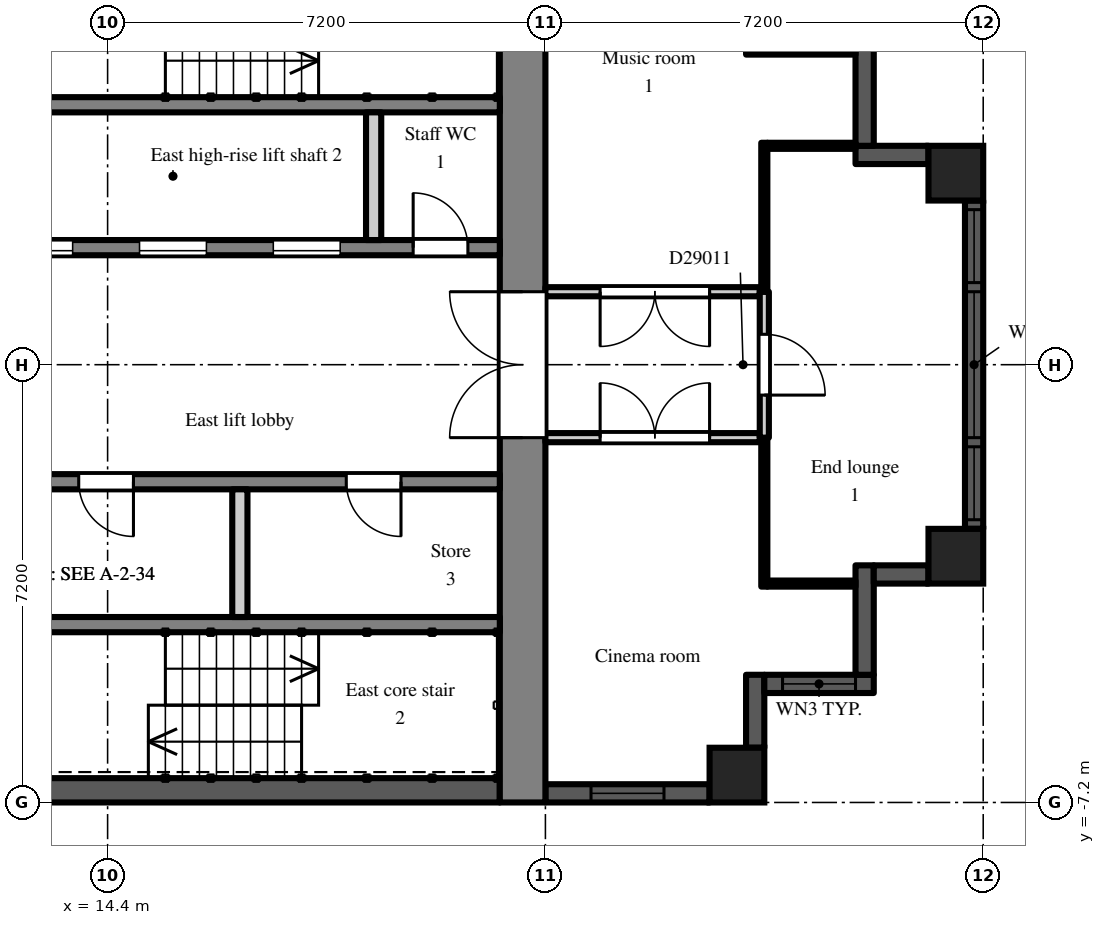
"""IFC4 building model, lengths in metres.
Left out: names, types, materials, properties, quantities, classifications, styles, units other than length and angle.
Written with IfcOpenShell. Run it as: python <this file> out.ifc"""

import sys

from ifc_helpers import new_model, si_unit, direction, frame, frame_2d, origin, origin_2d, place, context, subcontext, project, spatial, rectangle, extrude, element, fill, save


model = new_model("IFC4")
c1 = context("Model", 3, precision=1e-05, world=origin(), true_north=direction((0.0, 1.0)))
c2 = subcontext(c1, "Body", "Model", "MODEL_VIEW")
j1 = project(units=[si_unit("LENGTHUNIT", "METRE"), si_unit("PLANEANGLEUNIT", "RADIAN")], contexts=[c1])
p1 = place(None, origin())
s1 = spatial("IfcSite", under=j1, at=p1, CompositionType="ELEMENT")
p2 = place(p1, origin())
s2 = spatial("IfcBuilding", under=s1, at=p2, CompositionType="ELEMENT")
p3 = place(p2, frame((0.0, 0.0, 201.9)))
s3 = spatial("IfcBuildingStorey", under=s2, at=p3, CompositionType="ELEMENT", Elevation=201.9)
for number, where, z_axis, x_axis in (
    (1, (24.75, -6.75, 0.0), (0.0, 0.0, 1.0), (1.0, 0.0, 0.0)),
    (2, (28.35, -3.15, 0.0), (0.0, 0.0, 1.0), (1.0, 0.0, 0.0)),
    (3, (28.35, 3.15, 0.0), (0.0, 0.0, 1.0), (1.0, 0.0, 0.0)),
):
    element("IfcColumn", number, at=place(p3, frame(where, z_axis=z_axis, x_axis=x_axis)), inside=s3, PredefinedType="COLUMN", context=c2, shape_type="SweptSolid", body=[
        extrude(rectangle(XDim=0.9, YDim=0.9, at=origin_2d()), origin(), (0.0, 0.0, 1.0), 3.0),
    ])
p4 = place(p3, frame((21.6, -7.05, 0.0), z_axis=(0.0, 0.0, 1.0), x_axis=(1.0, 0.0, 0.0)))
e4 = element("IfcWall", 4, at=p4, inside=s3, PredefinedType="SOLIDWALL", context=c2, shape_type="SweptSolid", body=[
    extrude(rectangle(XDim=2.7, YDim=0.3, at=frame_2d((1.35, 0.0))), origin(), (0.0, 0.0, 1.0), 2.3),
])
p5 = place(p4, frame((0.75, 0.0, 0.2)))
e5 = element("IfcOpeningElement", 5, at=p5, cuts=e4, PredefinedType="OPENING", context=c2, shape_type="SweptSolid", body=[
    extrude(rectangle(XDim=1.2, YDim=1.85, at=frame_2d((0.6, 0.925))), frame((0.0, 0.16, 0.0), z_axis=(0.0, -1.0, 0.0), x_axis=(1.0, 0.0, 0.0)), (0.0, 0.0, 1.0), 0.32),
])
p6 = place(p3, frame((25.05, -6.3, 0.0), z_axis=(0.0, 0.0, 1.0), x_axis=(0.0, 1.0, 0.0)))
e6 = element("IfcWall", 6, at=p6, inside=s3, PredefinedType="SOLIDWALL", context=c2, shape_type="SweptSolid", body=[
    extrude(rectangle(XDim=1.2, YDim=0.3, at=frame_2d((0.6, 0.0))), origin(), (0.0, 0.0, 1.0), 2.6),
])
p7 = place(p3, frame((25.2, -5.25, 0.0), z_axis=(0.0, 0.0, 1.0), x_axis=(1.0, 0.0, 0.0)))
e7 = element("IfcWall", 7, at=p7, inside=s3, PredefinedType="SOLIDWALL", context=c2, shape_type="SweptSolid", body=[
    extrude(rectangle(XDim=1.8, YDim=0.3, at=frame_2d((0.9, 0.0))), origin(), (0.0, 0.0, 1.0), 2.6),
])
p8 = place(p7, frame((0.3, 0.0, 0.2)))
e8 = element("IfcOpeningElement", 8, at=p8, cuts=e7, PredefinedType="OPENING", context=c2, shape_type="SweptSolid", body=[
    extrude(rectangle(XDim=1.2, YDim=1.85, at=frame_2d((0.6, 0.925))), frame((0.0, 0.16, 0.0), z_axis=(0.0, -1.0, 0.0), x_axis=(1.0, 0.0, 0.0)), (0.0, 0.0, 1.0), 0.32),
])
p9 = place(p3, frame((26.85, -5.1, 0.0), z_axis=(0.0, 0.0, 1.0), x_axis=(0.0, 1.0, 0.0)))
e9 = element("IfcWall", 9, at=p9, inside=s3, PredefinedType="SOLIDWALL", context=c2, shape_type="SweptSolid", body=[
    extrude(rectangle(XDim=1.8, YDim=0.3, at=frame_2d((0.9, 0.0))), origin(), (0.0, 0.0, 1.0), 2.6),
])
p10 = place(p3, frame((27.0, -3.45, 0.0), z_axis=(0.0, 0.0, 1.0), x_axis=(1.0, 0.0, 0.0)))
e10 = element("IfcWall", 10, at=p10, inside=s3, PredefinedType="SOLIDWALL", context=c2, shape_type="SweptSolid", body=[
    extrude(rectangle(XDim=0.9, YDim=0.3, at=frame_2d((0.45, 0.0))), origin(), (0.0, 0.0, 1.0), 2.6),
])
p11 = place(p3, frame((28.65, -2.7, 0.0), z_axis=(0.0, 0.0, 1.0), x_axis=(0.0, 1.0, 0.0)))
e11 = element("IfcWall", 11, at=p11, inside=s3, PredefinedType="SOLIDWALL", context=c2, shape_type="SweptSolid", body=[
    extrude(rectangle(XDim=5.4, YDim=0.3, at=frame_2d((2.7, 0.0))), origin(), (0.0, 0.0, 1.0), 2.3),
])
p12 = place(p11, frame((1.5, 0.0, 0.2)))
e12 = element("IfcOpeningElement", 12, at=p12, cuts=e11, PredefinedType="OPENING", context=c2, shape_type="SweptSolid", body=[
    extrude(rectangle(XDim=2.4, YDim=1.85, at=frame_2d((1.2, 0.925))), frame((0.0, 0.16, 0.0), z_axis=(0.0, -1.0, 0.0), x_axis=(1.0, 0.0, 0.0)), (0.0, 0.0, 1.0), 0.32),
])
p13 = place(p11, frame((0.15, 0.0, 0.2)))
e13 = element("IfcOpeningElement", 13, at=p13, cuts=e11, PredefinedType="OPENING", context=c2, shape_type="SweptSolid", body=[
    extrude(rectangle(XDim=1.2, YDim=1.85, at=frame_2d((0.6, 0.925))), frame((0.0, 0.16, 0.0), z_axis=(0.0, -1.0, 0.0), x_axis=(1.0, 0.0, 0.0)), (0.0, 0.0, 1.0), 0.32),
])
p14 = place(p11, frame((4.05, 0.0, 0.2)))
e14 = element("IfcOpeningElement", 14, at=p14, cuts=e11, PredefinedType="OPENING", context=c2, shape_type="SweptSolid", body=[
    extrude(rectangle(XDim=1.2, YDim=1.85, at=frame_2d((0.6, 0.925))), frame((0.0, 0.16, 0.0), z_axis=(0.0, -1.0, 0.0), x_axis=(1.0, 0.0, 0.0)), (0.0, 0.0, 1.0), 0.32),
])
p15 = place(p3, frame((27.9, 3.45, 0.0), z_axis=(0.0, 0.0, 1.0), x_axis=(-1.0, 0.0, 0.0)))
e15 = element("IfcWall", 15, at=p15, inside=s3, PredefinedType="SOLIDWALL", context=c2, shape_type="SweptSolid", body=[
    extrude(rectangle(XDim=1.2, YDim=0.3, at=frame_2d((0.6, 0.0))), origin(), (0.0, 0.0, 1.0), 2.6),
])
p16 = place(p3, frame((26.85, 3.6, 0.0), z_axis=(0.0, 0.0, 1.0), x_axis=(0.0, 1.0, 0.0)))
e16 = element("IfcWall", 16, at=p16, inside=s3, PredefinedType="SOLIDWALL", context=c2, shape_type="SweptSolid", body=[
    extrude(rectangle(XDim=1.8, YDim=0.3, at=frame_2d((0.9, 0.0))), origin(), (0.0, 0.0, 1.0), 2.6),
])
p17 = place(p3, frame((26.7, 5.25, 0.0), z_axis=(0.0, 0.0, 1.0), x_axis=(-1.0, 0.0, 0.0)))
e17 = element("IfcWall", 17, at=p17, inside=s3, PredefinedType="SOLIDWALL", context=c2, shape_type="SweptSolid", body=[
    extrude(rectangle(XDim=1.8, YDim=0.3, at=frame_2d((0.9, 0.0))), origin(), (0.0, 0.0, 1.0), 2.6),
])
p18 = place(p3, frame((21.225, -7.2, 0.0), z_axis=(0.0, 0.0, 1.0), x_axis=(0.0, 1.0, 0.0)))
e18 = element("IfcWall", 18, at=p18, inside=s3, PredefinedType="SHEAR", context=c2, shape_type="SweptSolid", body=[
    extrude(rectangle(XDim=14.4, YDim=0.75, at=frame_2d((7.2, 0.0))), origin(), (0.0, 0.0, 1.0), 2.6),
])
p19 = place(p18, frame((6.0, 0.0, 0.0)))
e19 = element("IfcOpeningElement", 19, at=p19, cuts=e18, PredefinedType="OPENING", context=c2, shape_type="SweptSolid", body=[
    extrude(rectangle(XDim=2.4, YDim=2.2, at=frame_2d((1.2, 1.1))), frame((0.0, 0.385, 0.0), z_axis=(0.0, -1.0, 0.0), x_axis=(1.0, 0.0, 0.0)), (0.0, 0.0, 1.0), 0.77),
])
p20 = place(p3, frame((7.9, 1.925, 0.0), z_axis=(0.0, 0.0, 1.0), x_axis=(1.0, 0.0, 0.0)))
e20 = element("IfcWall", 20, at=p20, inside=s3, PredefinedType="SHEAR", context=c2, shape_type="SweptSolid", body=[
    extrude(rectangle(XDim=12.95, YDim=0.25, at=frame_2d((6.475, 0.0))), origin(), (0.0, 0.0, 1.0), 2.6),
])
p21 = place(p20, frame((4.825, 0.0, 0.0)))
e21 = element("IfcOpeningElement", 21, at=p21, cuts=e20, PredefinedType="OPENING", context=c2, shape_type="SweptSolid", body=[
    extrude(rectangle(XDim=1.1, YDim=2.1, at=frame_2d((0.55, 1.05))), frame((0.0, 0.135, 0.0), z_axis=(0.0, -1.0, 0.0), x_axis=(1.0, 0.0, 0.0)), (0.0, 0.0, 1.0), 0.27),
])
p22 = place(p20, frame((7.025, 0.0, 0.0)))
e22 = element("IfcOpeningElement", 22, at=p22, cuts=e20, PredefinedType="OPENING", context=c2, shape_type="SweptSolid", body=[
    extrude(rectangle(XDim=1.1, YDim=2.1, at=frame_2d((0.55, 1.05))), frame((0.0, 0.135, 0.0), z_axis=(0.0, -1.0, 0.0), x_axis=(1.0, 0.0, 0.0)), (0.0, 0.0, 1.0), 0.27),
])
p23 = place(p20, frame((9.225, 0.0, 0.0)))
e23 = element("IfcOpeningElement", 23, at=p23, cuts=e20, PredefinedType="OPENING", context=c2, shape_type="SweptSolid", body=[
    extrude(rectangle(XDim=1.1, YDim=2.1, at=frame_2d((0.55, 1.05))), frame((0.0, 0.135, 0.0), z_axis=(0.0, -1.0, 0.0), x_axis=(1.0, 0.0, 0.0)), (0.0, 0.0, 1.0), 0.27),
])
p24 = place(p20, frame((0.525, 0.0, 0.0)))
e24 = element("IfcOpeningElement", 24, at=p24, cuts=e20, PredefinedType="OPENING", context=c2, shape_type="SweptSolid", body=[
    extrude(rectangle(XDim=0.9, YDim=2.1, at=frame_2d((0.45, 1.05))), frame((0.0, 0.135, 0.0), z_axis=(0.0, -1.0, 0.0), x_axis=(1.0, 0.0, 0.0)), (0.0, 0.0, 1.0), 0.27),
])
p25 = place(p20, frame((2.625, 0.0, 0.0)))
e25 = element("IfcOpeningElement", 25, at=p25, cuts=e20, PredefinedType="OPENING", context=c2, shape_type="SweptSolid", body=[
    extrude(rectangle(XDim=1.1, YDim=2.1, at=frame_2d((0.55, 1.05))), frame((0.0, 0.135, 0.0), z_axis=(0.0, -1.0, 0.0), x_axis=(1.0, 0.0, 0.0)), (0.0, 0.0, 1.0), 0.27),
])
p26 = place(p20, frame((11.525, 0.0, 0.0)))
e26 = element("IfcOpeningElement", 26, at=p26, cuts=e20, PredefinedType="OPENING", context=c2, shape_type="SweptSolid", body=[
    extrude(rectangle(XDim=0.9, YDim=2.1, at=frame_2d((0.45, 1.05))), frame((0.0, 0.135, 0.0), z_axis=(0.0, -1.0, 0.0), x_axis=(1.0, 0.0, 0.0)), (0.0, 0.0, 1.0), 0.27),
])
p27 = place(p3, frame((12.3, 4.275, 0.0), z_axis=(0.0, 0.0, 1.0), x_axis=(1.0, 0.0, 0.0)))
e27 = element("IfcWall", 27, at=p27, inside=s3, PredefinedType="SHEAR", context=c2, shape_type="SweptSolid", body=[
    extrude(rectangle(XDim=8.55, YDim=0.25, at=frame_2d((4.275, 0.0))), origin(), (0.0, 0.0, 1.0), 2.6),
])
p28 = place(p3, frame((18.775, 2.05, 0.0), z_axis=(0.0, 0.0, 1.0), x_axis=(0.0, 1.0, 0.0)))
e28 = element("IfcWall", 28, at=p28, inside=s3, PredefinedType="PARTITIONING", context=c2, shape_type="SweptSolid", body=[
    extrude(rectangle(XDim=2.1, YDim=0.25, at=frame_2d((1.05, 0.0))), origin(), (0.0, 0.0, 1.0), 2.6),
])
p29 = place(p3, frame((7.9, -7.0, 0.0), z_axis=(0.0, 0.0, 1.0), x_axis=(1.0, 0.0, 0.0)))
e29 = element("IfcWall", 29, at=p29, inside=s3, PredefinedType="SHEAR", context=c2, shape_type="SweptSolid", body=[
    extrude(rectangle(XDim=12.95, YDim=0.4, at=frame_2d((6.475, 0.0))), origin(), (0.0, 0.0, 1.0), 2.6),
])
p30 = place(p3, frame((7.9, -1.925, 0.0), z_axis=(0.0, 0.0, 1.0), x_axis=(1.0, 0.0, 0.0)))
e30 = element("IfcWall", 30, at=p30, inside=s3, PredefinedType="SHEAR", context=c2, shape_type="SweptSolid", body=[
    extrude(rectangle(XDim=12.95, YDim=0.25, at=frame_2d((6.475, 0.0))), origin(), (0.0, 0.0, 1.0), 2.6),
])
p31 = place(p30, frame((0.525, 0.0, 0.0)))
e31 = element("IfcOpeningElement", 31, at=p31, cuts=e30, PredefinedType="OPENING", context=c2, shape_type="SweptSolid", body=[
    extrude(rectangle(XDim=0.9, YDim=2.1, at=frame_2d((0.45, 1.05))), frame((0.0, 0.135, 0.0), z_axis=(0.0, -1.0, 0.0), x_axis=(1.0, 0.0, 0.0)), (0.0, 0.0, 1.0), 0.27),
])
p32 = place(p30, frame((2.625, 0.0, 0.0)))
e32 = element("IfcOpeningElement", 32, at=p32, cuts=e30, PredefinedType="OPENING", context=c2, shape_type="SweptSolid", body=[
    extrude(rectangle(XDim=1.1, YDim=2.1, at=frame_2d((0.55, 1.05))), frame((0.0, 0.135, 0.0), z_axis=(0.0, -1.0, 0.0), x_axis=(1.0, 0.0, 0.0)), (0.0, 0.0, 1.0), 0.27),
])
p33 = place(p30, frame((6.025, 0.0, 0.0)))
e33 = element("IfcOpeningElement", 33, at=p33, cuts=e30, PredefinedType="OPENING", context=c2, shape_type="SweptSolid", body=[
    extrude(rectangle(XDim=0.9, YDim=2.1, at=frame_2d((0.45, 1.05))), frame((0.0, 0.135, 0.0), z_axis=(0.0, -1.0, 0.0), x_axis=(1.0, 0.0, 0.0)), (0.0, 0.0, 1.0), 0.27),
])
p34 = place(p30, frame((10.425, 0.0, 0.0)))
e34 = element("IfcOpeningElement", 34, at=p34, cuts=e30, PredefinedType="OPENING", context=c2, shape_type="SweptSolid", body=[
    extrude(rectangle(XDim=0.9, YDim=2.1, at=frame_2d((0.45, 1.05))), frame((0.0, 0.135, 0.0), z_axis=(0.0, -1.0, 0.0), x_axis=(1.0, 0.0, 0.0)), (0.0, 0.0, 1.0), 0.27),
])
p35 = place(p3, frame((12.3, -4.275, 0.0), z_axis=(0.0, 0.0, 1.0), x_axis=(1.0, 0.0, 0.0)))
e35 = element("IfcWall", 35, at=p35, inside=s3, PredefinedType="SHEAR", context=c2, shape_type="SweptSolid", body=[
    extrude(rectangle(XDim=8.55, YDim=0.25, at=frame_2d((4.275, 0.0))), origin(), (0.0, 0.0, 1.0), 2.6),
])
p36 = place(p3, frame((16.575, -2.05, 0.0), z_axis=(0.0, 0.0, 1.0), x_axis=(0.0, -1.0, 0.0)))
e36 = element("IfcWall", 36, at=p36, inside=s3, PredefinedType="PARTITIONING", context=c2, shape_type="SweptSolid", body=[
    extrude(rectangle(XDim=2.1, YDim=0.25, at=frame_2d((1.05, 0.0))), origin(), (0.0, 0.0, 1.0), 2.6),
])
p37 = place(p3, frame((21.6, -1.2, 0.0), z_axis=(0.0, 0.0, 1.0), x_axis=(1.0, 0.0, 0.0)))
e37 = element("IfcWall", 37, at=p37, inside=s3, PredefinedType="PARTITIONING", context=c2, shape_type="SweptSolid", body=[
    extrude(rectangle(XDim=3.525, YDim=0.15, at=frame_2d((1.762, 0.0))), origin(), (0.0, 0.0, 1.0), 2.6),
])
p38 = place(p37, frame((0.9, 0.0, 0.0)))
e38 = element("IfcOpeningElement", 38, at=p38, cuts=e37, PredefinedType="OPENING", context=c2, shape_type="SweptSolid", body=[
    extrude(rectangle(XDim=1.8, YDim=2.1, at=frame_2d((0.9, 1.05))), frame((0.0, 0.085, 0.0), z_axis=(0.0, -1.0, 0.0), x_axis=(1.0, 0.0, 0.0)), (0.0, 0.0, 1.0), 0.17),
])
p39 = place(p3, frame((21.6, 1.2, 0.0), z_axis=(0.0, 0.0, 1.0), x_axis=(1.0, 0.0, 0.0)))
e39 = element("IfcWall", 39, at=p39, inside=s3, PredefinedType="PARTITIONING", context=c2, shape_type="SweptSolid", body=[
    extrude(rectangle(XDim=3.525, YDim=0.15, at=frame_2d((1.762, 0.0))), origin(), (0.0, 0.0, 1.0), 2.6),
])
p40 = place(p39, frame((0.9, 0.0, 0.0)))
e40 = element("IfcOpeningElement", 40, at=p40, cuts=e39, PredefinedType="OPENING", context=c2, shape_type="SweptSolid", body=[
    extrude(rectangle(XDim=1.8, YDim=2.1, at=frame_2d((0.9, 1.05))), frame((0.0, 0.085, 0.0), z_axis=(0.0, -1.0, 0.0), x_axis=(1.0, 0.0, 0.0)), (0.0, 0.0, 1.0), 0.17),
])
p41 = place(p3, frame((25.2, -3.65, 0.0), z_axis=(0.0, 0.0, 1.0), x_axis=(0.0, 1.0, 0.0)))
e41 = element("IfcWall", 41, at=p41, inside=s3, PredefinedType="PARTITIONING", context=c2, shape_type="SweptSolid", body=[
    extrude(rectangle(XDim=2.45, YDim=0.1, at=frame_2d((1.225, 0.0))), origin(), (0.0, 0.0, 1.0), 2.6),
])
p42 = place(p3, frame((25.25, -3.6, 0.0), z_axis=(0.0, 0.0, 1.0), x_axis=(1.0, 0.0, 0.0)))
e42 = element("IfcWall", 42, at=p42, inside=s3, PredefinedType="PARTITIONING", context=c2, shape_type="SweptSolid", body=[
    extrude(rectangle(XDim=1.45, YDim=0.1, at=frame_2d((0.725, 0.0))), origin(), (0.0, 0.0, 1.0), 2.6),
])
p43 = place(p3, frame((25.2, -1.2, 0.0), z_axis=(0.0, 0.0, 1.0), x_axis=(0.0, 1.0, 0.0)))
e43 = element("IfcWall", 43, at=p43, inside=s3, PredefinedType="PARTITIONING", context=c2, shape_type="SweptSolid", body=[
    extrude(rectangle(XDim=2.4, YDim=0.15, at=frame_2d((1.2, 0.0))), origin(), (0.0, 0.0, 1.0), 2.6),
])
p44 = place(p43, frame((0.7, 0.0, 0.0)))
e44 = element("IfcOpeningElement", 44, at=p44, cuts=e43, PredefinedType="OPENING", context=c2, shape_type="SweptSolid", body=[
    extrude(rectangle(XDim=1.0, YDim=2.1, at=frame_2d((0.5, 1.05))), frame((0.0, 0.085, 0.0), z_axis=(0.0, -1.0, 0.0), x_axis=(1.0, 0.0, 0.0)), (0.0, 0.0, 1.0), 0.17),
])
p45 = place(p3, frame((25.2, 1.2, 0.0), z_axis=(0.0, 0.0, 1.0), x_axis=(0.0, 1.0, 0.0)))
e45 = element("IfcWall", 45, at=p45, inside=s3, PredefinedType="PARTITIONING", context=c2, shape_type="SweptSolid", body=[
    extrude(rectangle(XDim=2.45, YDim=0.1, at=frame_2d((1.225, 0.0))), origin(), (0.0, 0.0, 1.0), 2.6),
])
p46 = place(p3, frame((25.25, 3.6, 0.0), z_axis=(0.0, 0.0, 1.0), x_axis=(1.0, 0.0, 0.0)))
e46 = element("IfcWall", 46, at=p46, inside=s3, PredefinedType="PARTITIONING", context=c2, shape_type="SweptSolid", body=[
    extrude(rectangle(XDim=1.45, YDim=0.1, at=frame_2d((0.725, 0.0))), origin(), (0.0, 0.0, 1.0), 2.6),
])
p47 = place(p5, origin())
e47 = element("IfcWindow", 47, at=p47, inside=s3, PartitioningType="SINGLE_PANEL", PredefinedType="WINDOW", context=c2, shape_type="SweptSolid", body=[
    extrude(rectangle(XDim=1.2, YDim=1.85, at=frame_2d((0.6, 0.925))), frame((0.0, 0.03, 0.0), z_axis=(0.0, -1.0, 0.0), x_axis=(1.0, 0.0, 0.0)), (0.0, 0.0, 1.0), 0.06),
])
fill(e5, e47)
p48 = place(p8, origin())
e48 = element("IfcWindow", 48, at=p48, inside=s3, PartitioningType="SINGLE_PANEL", PredefinedType="WINDOW", context=c2, shape_type="SweptSolid", body=[
    extrude(rectangle(XDim=1.2, YDim=1.85, at=frame_2d((0.6, 0.925))), frame((0.0, 0.03, 0.0), z_axis=(0.0, -1.0, 0.0), x_axis=(1.0, 0.0, 0.0)), (0.0, 0.0, 1.0), 0.06),
])
fill(e8, e48)
p49 = place(p12, origin())
e49 = element("IfcWindow", 49, at=p49, inside=s3, PartitioningType="SINGLE_PANEL", PredefinedType="WINDOW", context=c2, shape_type="SweptSolid", body=[
    extrude(rectangle(XDim=2.4, YDim=1.85, at=frame_2d((1.2, 0.925))), frame((0.0, 0.03, 0.0), z_axis=(0.0, -1.0, 0.0), x_axis=(1.0, 0.0, 0.0)), (0.0, 0.0, 1.0), 0.06),
])
fill(e12, e49)
p50 = place(p13, origin())
e50 = element("IfcWindow", 50, at=p50, inside=s3, PartitioningType="SINGLE_PANEL", PredefinedType="WINDOW", context=c2, shape_type="SweptSolid", body=[
    extrude(rectangle(XDim=1.2, YDim=1.85, at=frame_2d((0.6, 0.925))), frame((0.0, 0.03, 0.0), z_axis=(0.0, -1.0, 0.0), x_axis=(1.0, 0.0, 0.0)), (0.0, 0.0, 1.0), 0.06),
])
fill(e13, e50)
p51 = place(p14, origin())
e51 = element("IfcWindow", 51, at=p51, inside=s3, PartitioningType="SINGLE_PANEL", PredefinedType="WINDOW", context=c2, shape_type="SweptSolid", body=[
    extrude(rectangle(XDim=1.2, YDim=1.85, at=frame_2d((0.6, 0.925))), frame((0.0, 0.03, 0.0), z_axis=(0.0, -1.0, 0.0), x_axis=(1.0, 0.0, 0.0)), (0.0, 0.0, 1.0), 0.06),
])
fill(e14, e51)
p52 = place(p21, origin())
e52 = element("IfcDoor", 52, at=p52, inside=s3, OperationType="SLIDING_TO_LEFT", PredefinedType="DOOR", context=c2, shape_type="SweptSolid", body=[
    extrude(rectangle(XDim=1.1, YDim=2.1, at=frame_2d((0.55, 1.05))), frame((0.0, 0.025, 0.0), z_axis=(0.0, -1.0, 0.0), x_axis=(1.0, 0.0, 0.0)), (0.0, 0.0, 1.0), 0.05),
])
fill(e21, e52)
p53 = place(p22, origin())
e53 = element("IfcDoor", 53, at=p53, inside=s3, OperationType="SLIDING_TO_LEFT", PredefinedType="DOOR", context=c2, shape_type="SweptSolid", body=[
    extrude(rectangle(XDim=1.1, YDim=2.1, at=frame_2d((0.55, 1.05))), frame((0.0, 0.025, 0.0), z_axis=(0.0, -1.0, 0.0), x_axis=(1.0, 0.0, 0.0)), (0.0, 0.0, 1.0), 0.05),
])
fill(e22, e53)
p54 = place(p23, origin())
e54 = element("IfcDoor", 54, at=p54, inside=s3, OperationType="SLIDING_TO_LEFT", PredefinedType="DOOR", context=c2, shape_type="SweptSolid", body=[
    extrude(rectangle(XDim=1.1, YDim=2.1, at=frame_2d((0.55, 1.05))), frame((0.0, 0.025, 0.0), z_axis=(0.0, -1.0, 0.0), x_axis=(1.0, 0.0, 0.0)), (0.0, 0.0, 1.0), 0.05),
])
fill(e23, e54)
p55 = place(p19, origin())
e55 = element("IfcDoor", 55, at=p55, inside=s3, OperationType="DOUBLE_DOOR_DOUBLE_SWING", PredefinedType="DOOR", context=c2, shape_type="SweptSolid", body=[
    extrude(rectangle(XDim=2.4, YDim=2.2, at=frame_2d((1.2, 1.1))), frame((0.0, 0.025, 0.0), z_axis=(0.0, -1.0, 0.0), x_axis=(1.0, 0.0, 0.0)), (0.0, 0.0, 1.0), 0.05),
])
fill(e19, e55)
p56 = place(p26, origin())
e56 = element("IfcDoor", 56, at=p56, inside=s3, OperationType="SINGLE_SWING_LEFT", PredefinedType="DOOR", context=c2, shape_type="SweptSolid", body=[
    extrude(rectangle(XDim=0.9, YDim=2.1, at=frame_2d((0.45, 1.05))), frame((0.0, 0.025, 0.0), z_axis=(0.0, -1.0, 0.0), x_axis=(1.0, 0.0, 0.0)), (0.0, 0.0, 1.0), 0.05),
])
fill(e26, e56)
p57 = place(p33, frame((0.9, 0.0, 0.0), z_axis=(0.0, 0.0, 1.0), x_axis=(-1.0, 0.0, 0.0)))
e57 = element("IfcDoor", 57, at=p57, inside=s3, OperationType="SINGLE_SWING_LEFT", PredefinedType="DOOR", context=c2, shape_type="SweptSolid", body=[
    extrude(rectangle(XDim=0.9, YDim=2.1, at=frame_2d((0.45, 1.05))), frame((0.0, 0.025, 0.0), z_axis=(0.0, -1.0, 0.0), x_axis=(1.0, 0.0, 0.0)), (0.0, 0.0, 1.0), 0.05),
])
fill(e33, e57)
p58 = place(p34, frame((0.9, 0.0, 0.0), z_axis=(0.0, 0.0, 1.0), x_axis=(-1.0, 0.0, 0.0)))
e58 = element("IfcDoor", 58, at=p58, inside=s3, OperationType="SINGLE_SWING_LEFT", PredefinedType="DOOR", context=c2, shape_type="SweptSolid", body=[
    extrude(rectangle(XDim=0.9, YDim=2.1, at=frame_2d((0.45, 1.05))), frame((0.0, 0.025, 0.0), z_axis=(0.0, -1.0, 0.0), x_axis=(1.0, 0.0, 0.0)), (0.0, 0.0, 1.0), 0.05),
])
fill(e34, e58)
p59 = place(p44, frame((1.0, 0.0, 0.0), z_axis=(0.0, 0.0, 1.0), x_axis=(-1.0, 0.0, 0.0)))
e59 = element("IfcDoor", 59, at=p59, inside=s3, OperationType="SINGLE_SWING_RIGHT", PredefinedType="DOOR", context=c2, shape_type="SweptSolid", body=[
    extrude(rectangle(XDim=1.0, YDim=2.1, at=frame_2d((0.5, 1.05))), frame((0.0, 0.025, 0.0), z_axis=(0.0, -1.0, 0.0), x_axis=(1.0, 0.0, 0.0)), (0.0, 0.0, 1.0), 0.05),
])
fill(e44, e59)
p60 = place(p40, frame((1.8, 0.0, 0.0), z_axis=(0.0, 0.0, 1.0), x_axis=(-1.0, 0.0, 0.0)))
e60 = element("IfcDoor", 60, at=p60, inside=s3, OperationType="DOUBLE_DOOR_DOUBLE_SWING", PredefinedType="DOOR", context=c2, shape_type="SweptSolid", body=[
    extrude(rectangle(XDim=1.8, YDim=2.1, at=frame_2d((0.9, 1.05))), frame((0.0, 0.025, 0.0), z_axis=(0.0, -1.0, 0.0), x_axis=(1.0, 0.0, 0.0)), (0.0, 0.0, 1.0), 0.05),
])
fill(e40, e60)
p61 = place(p38, origin())
e61 = element("IfcDoor", 61, at=p61, inside=s3, OperationType="DOUBLE_DOOR_DOUBLE_SWING", PredefinedType="DOOR", context=c2, shape_type="SweptSolid", body=[
    extrude(rectangle(XDim=1.8, YDim=2.1, at=frame_2d((0.9, 1.05))), frame((0.0, 0.025, 0.0), z_axis=(0.0, -1.0, 0.0), x_axis=(1.0, 0.0, 0.0)), (0.0, 0.0, 1.0), 0.05),
])
fill(e38, e61)
save(model, sys.argv[1])
